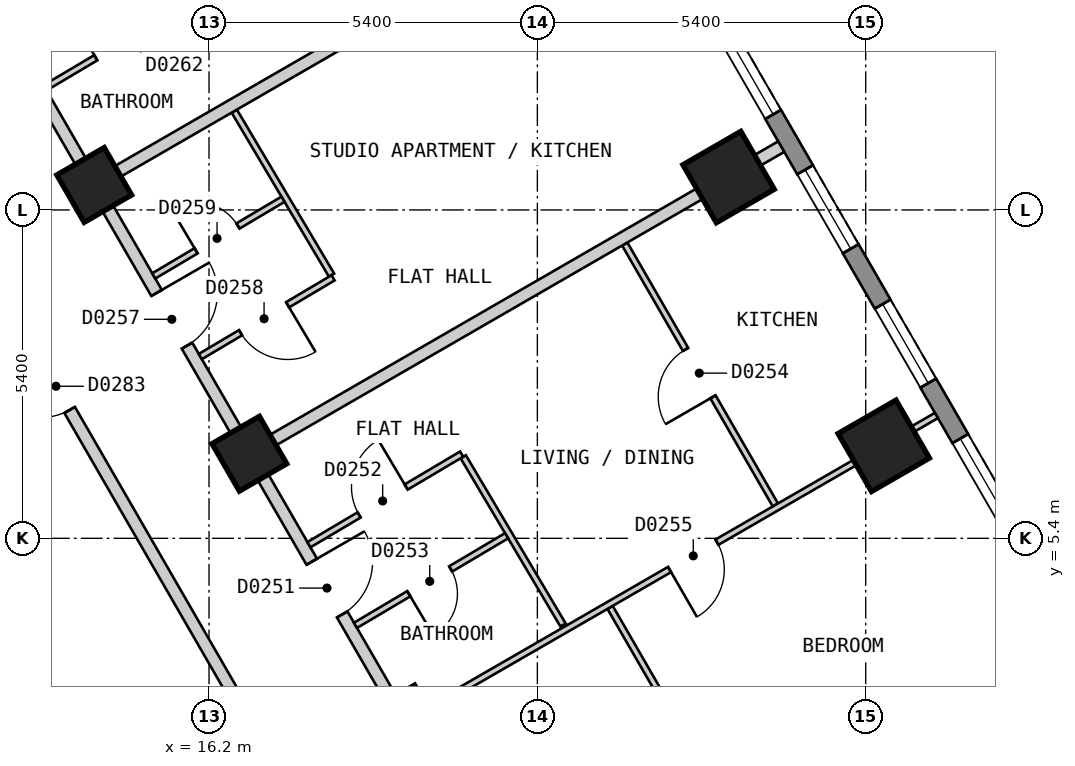
"""IFC4 building model, lengths in metres.
Left out: names, types, materials, properties, quantities, classifications, styles, units other than length and angle.
Written with IfcOpenShell. Run it as: python <this file> out.ifc"""

import sys

from ifc_helpers import new_model, si_unit, direction, frame, frame_2d, origin, origin_2d, place, context, subcontext, project, spatial, polyline, rectangle, outline, extrude, element, fill, save


model = new_model("IFC4")
c1 = context("Model", 3, precision=1e-05, world=origin(), true_north=direction((0.0, 1.0)))
c2 = subcontext(c1, "Body", "Model", "MODEL_VIEW")
j1 = project(units=[si_unit("LENGTHUNIT", "METRE"), si_unit("PLANEANGLEUNIT", "RADIAN")], contexts=[c1])
p1 = place(None, origin())
s1 = spatial("IfcSite", under=j1, at=p1, CompositionType="ELEMENT")
p2 = place(p1, origin())
s2 = spatial("IfcBuilding", under=s1, at=p2, CompositionType="ELEMENT")
p3 = place(p2, frame((0.0, 0.0, 47.4)))
s3 = spatial("IfcBuildingStorey", under=s2, at=p3, CompositionType="ELEMENT", Elevation=47.4)
for number, where, z_axis, x_axis in (
    (1, (29.848, 2.5, 0.0), (0.0, 0.0, 1.0), (-0.5, 0.866, 0.0)),
    (2, (27.297, 6.921, 0.0), (0.0, 0.0, 1.0), (-0.5, 0.866, 0.0)),
    (3, (24.745, 11.341, 0.0), (0.0, 0.0, 1.0), (-0.5, 0.866, 0.0)),
):
    element("IfcColumn", number, at=place(p3, frame(where, z_axis=z_axis, x_axis=x_axis)), inside=s3, PredefinedType="COLUMN", context=c2, shape_type="SweptSolid", body=[
        extrude(rectangle(XDim=1.1, YDim=1.1, at=origin_2d()), origin(), (0.0, 0.0, 1.0), 3.0),
    ])
for number, where, z_axis, x_axis in (
    (4, (19.416, 2.371, 0.0), (0.0, 0.0, 1.0), (-0.5, 0.866, 0.0)),
    (5, (16.864, 6.791, 0.0), (0.0, 0.0, 1.0), (-0.5, 0.866, 0.0)),
    (6, (14.312, 11.211, 0.0), (0.0, 0.0, 1.0), (-0.5, 0.866, 0.0)),
):
    element("IfcColumn", number, at=place(p3, frame(where, z_axis=z_axis, x_axis=x_axis)), inside=s3, PredefinedType="COLUMN", context=c2, shape_type="SweptSolid", body=[
        extrude(rectangle(XDim=0.9, YDim=0.9, at=origin_2d()), origin(), (0.0, 0.0, 1.0), 3.0),
    ])
p4 = place(p3, frame((31.22, 2.425, 0.0), z_axis=(0.0, 0.0, 1.0), x_axis=(-0.500001938803, 0.866024284413, 0.0)))
e7 = element("IfcWall", 7, at=p4, inside=s3, PredefinedType="SOLIDWALL", context=c2, shape_type="SweptSolid", body=[
    extrude(outline(polyline([(0.0, -0.15), (27.02, -0.15), (26.94, 0.15), (0.08, 0.15), (0.0, -0.15)])), origin(), (0.0, 0.0, 1.0), 2.7),
])
p5 = place(p4, frame((1.277, 0.0, 0.15)))
e8 = element("IfcOpeningElement", 8, at=p5, cuts=e7, PredefinedType="OPENING", context=c2, shape_type="SweptSolid", body=[
    extrude(rectangle(XDim=1.5, YDim=2.1, at=frame_2d((0.75, 1.05))), frame((0.0, 0.16, 0.0), z_axis=(0.0, -1.0, 0.0), x_axis=(1.0, 0.0, 0.0)), (0.0, 0.0, 1.0), 0.32),
])
p6 = place(p4, frame((3.829, 0.0, 0.15)))
e9 = element("IfcOpeningElement", 9, at=p6, cuts=e7, PredefinedType="OPENING", context=c2, shape_type="SweptSolid", body=[
    extrude(rectangle(XDim=1.5, YDim=2.1, at=frame_2d((0.75, 1.05))), frame((0.0, 0.16, 0.0), z_axis=(0.0, -1.0, 0.0), x_axis=(1.0, 0.0, 0.0)), (0.0, 0.0, 1.0), 0.32),
])
p7 = place(p4, frame((6.382, 0.0, 0.15)))
e10 = element("IfcOpeningElement", 10, at=p7, cuts=e7, PredefinedType="OPENING", context=c2, shape_type="SweptSolid", body=[
    extrude(rectangle(XDim=1.5, YDim=2.1, at=frame_2d((0.75, 1.05))), frame((0.0, 0.16, 0.0), z_axis=(0.0, -1.0, 0.0), x_axis=(1.0, 0.0, 0.0)), (0.0, 0.0, 1.0), 0.32),
])
p8 = place(p4, frame((8.933, 0.0, 0.15)))
e11 = element("IfcOpeningElement", 11, at=p8, cuts=e7, PredefinedType="OPENING", context=c2, shape_type="SweptSolid", body=[
    extrude(rectangle(XDim=1.5, YDim=2.1, at=frame_2d((0.75, 1.05))), frame((0.0, 0.16, 0.0), z_axis=(0.0, -1.0, 0.0), x_axis=(1.0, 0.0, 0.0)), (0.0, 0.0, 1.0), 0.32),
])
p9 = place(p4, frame((11.485, 0.0, 0.15)))
e12 = element("IfcOpeningElement", 12, at=p9, cuts=e7, PredefinedType="OPENING", context=c2, shape_type="SweptSolid", body=[
    extrude(rectangle(XDim=1.5, YDim=2.1, at=frame_2d((0.75, 1.05))), frame((0.0, 0.16, 0.0), z_axis=(0.0, -1.0, 0.0), x_axis=(1.0, 0.0, 0.0)), (0.0, 0.0, 1.0), 0.32),
])
p10 = place(p4, frame((14.037, 0.0, 0.15)))
e13 = element("IfcOpeningElement", 13, at=p10, cuts=e7, PredefinedType="OPENING", context=c2, shape_type="SweptSolid", body=[
    extrude(rectangle(XDim=1.5, YDim=2.1, at=frame_2d((0.75, 1.05))), frame((0.0, 0.16, 0.0), z_axis=(0.0, -1.0, 0.0), x_axis=(1.0, 0.0, 0.0)), (0.0, 0.0, 1.0), 0.32),
])
p11 = place(p4, frame((16.589, 0.0, 0.15)))
e14 = element("IfcOpeningElement", 14, at=p11, cuts=e7, PredefinedType="OPENING", context=c2, shape_type="SweptSolid", body=[
    extrude(rectangle(XDim=1.5, YDim=2.1, at=frame_2d((0.75, 1.05))), frame((0.0, 0.16, 0.0), z_axis=(0.0, -1.0, 0.0), x_axis=(1.0, 0.0, 0.0)), (0.0, 0.0, 1.0), 0.32),
])
p12 = place(p4, frame((19.141, 0.0, 0.15)))
e15 = element("IfcOpeningElement", 15, at=p12, cuts=e7, PredefinedType="OPENING", context=c2, shape_type="SweptSolid", body=[
    extrude(rectangle(XDim=1.5, YDim=2.1, at=frame_2d((0.75, 1.05))), frame((0.0, 0.16, 0.0), z_axis=(0.0, -1.0, 0.0), x_axis=(1.0, 0.0, 0.0)), (0.0, 0.0, 1.0), 0.32),
])
p13 = place(p4, frame((21.693, 0.0, 0.15)))
e16 = element("IfcOpeningElement", 16, at=p13, cuts=e7, PredefinedType="OPENING", context=c2, shape_type="SweptSolid", body=[
    extrude(rectangle(XDim=1.5, YDim=2.1, at=frame_2d((0.75, 1.05))), frame((0.0, 0.16, 0.0), z_axis=(0.0, -1.0, 0.0), x_axis=(1.0, 0.0, 0.0)), (0.0, 0.0, 1.0), 0.32),
])
p14 = place(p4, frame((24.244, 0.0, 0.15)))
e17 = element("IfcOpeningElement", 17, at=p14, cuts=e7, PredefinedType="OPENING", context=c2, shape_type="SweptSolid", body=[
    extrude(rectangle(XDim=1.5, YDim=2.1, at=frame_2d((0.75, 1.05))), frame((0.0, 0.16, 0.0), z_axis=(0.0, -1.0, 0.0), x_axis=(1.0, 0.0, 0.0)), (0.0, 0.0, 1.0), 0.32),
])
p15 = place(p3, frame((9.18, 15.7, 0.0), z_axis=(0.0, 0.0, 1.0), x_axis=(0.500003652032, -0.866023295272, 0.0)))
e18 = element("IfcWall", 18, at=p15, inside=s3, PredefinedType="PARTITIONING", context=c2, shape_type="SweptSolid", body=[
    extrude(rectangle(XDim=18.012, YDim=0.2, at=frame_2d((9.006, 0.0))), origin(), (0.0, 0.0, 1.0), 2.7),
])
p16 = place(p15, frame((8.556, 0.0, 0.0)))
e19 = element("IfcOpeningElement", 19, at=p16, cuts=e18, PredefinedType="OPENING", context=c2, shape_type="SweptSolid", body=[
    extrude(rectangle(XDim=0.9, YDim=2.1, at=frame_2d((0.45, 1.05))), frame((0.0, 0.11, 0.0), z_axis=(0.0, -1.0, 0.0), x_axis=(1.0, 0.0, 0.0)), (0.0, 0.0, 1.0), 0.22),
])
p17 = place(p3, frame((10.45, 17.9, 0.0), z_axis=(0.0, 0.0, 1.0), x_axis=(0.500034352617, -0.866005569383, 0.0)))
e20 = element("IfcWall", 20, at=p17, inside=s3, PredefinedType="PARTITIONING", context=c2, shape_type="SweptSolid", body=[
    extrude(rectangle(XDim=20.553, YDim=0.2, at=frame_2d((10.276, 0.0))), origin(), (0.0, 0.0, 1.0), 2.7),
])
p18 = place(p17, frame((14.879, 0.0, 0.0)))
e21 = element("IfcOpeningElement", 21, at=p18, cuts=e20, PredefinedType="OPENING", context=c2, shape_type="SweptSolid", body=[
    extrude(rectangle(XDim=1.0, YDim=2.1, at=frame_2d((0.5, 1.05))), frame((0.0, 0.11, 0.0), z_axis=(0.0, -1.0, 0.0), x_axis=(1.0, 0.0, 0.0)), (0.0, 0.0, 1.0), 0.22),
])
p19 = place(p17, frame((9.775, 0.0, 0.0)))
e22 = element("IfcOpeningElement", 22, at=p19, cuts=e20, PredefinedType="OPENING", context=c2, shape_type="SweptSolid", body=[
    extrude(rectangle(XDim=1.0, YDim=2.1, at=frame_2d((0.5, 1.05))), frame((0.0, 0.11, 0.0), z_axis=(0.0, -1.0, 0.0), x_axis=(1.0, 0.0, 0.0)), (0.0, 0.0, 1.0), 0.22),
])
p20 = place(p17, frame((4.671, 0.0, 0.0)))
e23 = element("IfcOpeningElement", 23, at=p20, cuts=e20, PredefinedType="OPENING", context=c2, shape_type="SweptSolid", body=[
    extrude(rectangle(XDim=1.0, YDim=2.1, at=frame_2d((0.5, 1.05))), frame((0.0, 0.11, 0.0), z_axis=(0.0, -1.0, 0.0), x_axis=(1.0, 0.0, 0.0)), (0.0, 0.0, 1.0), 0.22),
])
p21 = place(p3, frame((16.615, 12.425, 0.0), z_axis=(0.0, 0.0, 1.0), x_axis=(0.510241930604, -0.860030913546, 0.0)))
e24 = element("IfcWall", 24, at=p21, inside=s3, PredefinedType="PARTITIONING", context=c2, shape_type="SweptSolid", body=[
    extrude(rectangle(XDim=3.136, YDim=0.1, at=frame_2d((1.568, 0.0))), origin(), (0.0, 0.0, 1.0), 2.7),
])
p22 = place(p3, frame((20.381, 6.741, 0.0), z_axis=(0.0, 0.0, 1.0), x_axis=(0.510224755389, -0.860041103081, 0.0)))
e25 = element("IfcWall", 25, at=p22, inside=s3, PredefinedType="PARTITIONING", context=c2, shape_type="SweptSolid", body=[
    extrude(rectangle(XDim=3.216, YDim=0.1, at=frame_2d((1.608, 0.0))), origin(), (0.0, 0.0, 1.0), 2.7),
])
p23 = place(p3, frame((22.796, 4.264, 0.0), z_axis=(0.0, 0.0, 1.0), x_axis=(0.500099052605, -0.865968208183, 0.0)))
e26 = element("IfcWall", 26, at=p23, inside=s3, PredefinedType="PARTITIONING", context=c2, shape_type="SweptSolid", body=[
    extrude(rectangle(XDim=4.807, YDim=0.1, at=frame_2d((2.404, 0.0))), origin(), (0.0, 0.0, 1.0), 2.7),
])
p24 = place(p23, frame((2.037, 0.0, 0.0)))
e27 = element("IfcOpeningElement", 27, at=p24, cuts=e26, PredefinedType="OPENING", context=c2, shape_type="SweptSolid", body=[
    extrude(rectangle(XDim=0.8, YDim=2.1, at=frame_2d((0.4, 1.05))), frame((0.0, 0.06, 0.0), z_axis=(0.0, -1.0, 0.0), x_axis=(1.0, 0.0, 0.0)), (0.0, 0.0, 1.0), 0.12),
])
p25 = place(p3, frame((23.037, 10.24, 0.0), z_axis=(0.0, 0.0, 1.0), x_axis=(0.499907296314, -0.866078919667, 0.0)))
e28 = element("IfcWall", 28, at=p25, inside=s3, PredefinedType="PARTITIONING", context=c2, shape_type="SweptSolid", body=[
    extrude(rectangle(XDim=4.955, YDim=0.1, at=frame_2d((2.477, 0.0))), origin(), (0.0, 0.0, 1.0), 2.7),
])
p26 = place(p25, frame((2.002, 0.0, 0.0)))
e29 = element("IfcOpeningElement", 29, at=p26, cuts=e28, PredefinedType="OPENING", context=c2, shape_type="SweptSolid", body=[
    extrude(rectangle(XDim=0.9, YDim=2.1, at=frame_2d((0.45, 1.05))), frame((0.0, 0.06, 0.0), z_axis=(0.0, -1.0, 0.0), x_axis=(1.0, 0.0, 0.0)), (0.0, 0.0, 1.0), 0.12),
])
p27 = place(p3, frame((19.503, 2.421, 0.0), z_axis=(0.0, 0.0, 1.0), x_axis=(0.866065245018, 0.499930986609, 0.0)))
e30 = element("IfcWall", 30, at=p27, inside=s3, PredefinedType="PARTITIONING", context=c2, shape_type="SweptSolid", body=[
    extrude(rectangle(XDim=10.0, YDim=0.1, at=frame_2d((5.0, 0.0))), origin(), (0.0, 0.0, 1.0), 2.7),
])
p28 = place(p27, frame((4.932, 0.0, 0.0)))
e31 = element("IfcOpeningElement", 31, at=p28, cuts=e30, PredefinedType="OPENING", context=c2, shape_type="SweptSolid", body=[
    extrude(rectangle(XDim=0.9, YDim=2.1, at=frame_2d((0.45, 1.05))), frame((0.0, 0.06, 0.0), z_axis=(0.0, -1.0, 0.0), x_axis=(1.0, 0.0, 0.0)), (0.0, 0.0, 1.0), 0.12),
])
p29 = place(p3, frame((17.843, 5.295, 0.0), z_axis=(0.0, 0.0, 1.0), x_axis=(0.860078277555, 0.510162088436, 0.0)))
e32 = element("IfcWall", 32, at=p29, inside=s3, PredefinedType="PARTITIONING", context=c2, shape_type="SweptSolid", body=[
    extrude(rectangle(XDim=2.921, YDim=0.1, at=frame_2d((1.46, 0.0))), origin(), (0.0, 0.0, 1.0), 2.7),
])
p30 = place(p29, frame((0.96, 0.0, 0.0)))
e33 = element("IfcOpeningElement", 33, at=p30, cuts=e32, PredefinedType="OPENING", context=c2, shape_type="SweptSolid", body=[
    extrude(rectangle(XDim=0.9, YDim=2.1, at=frame_2d((0.45, 1.05))), frame((0.0, 0.06, 0.0), z_axis=(0.0, -1.0, 0.0), x_axis=(1.0, 0.0, 0.0)), (0.0, 0.0, 1.0), 0.12),
])
p31 = place(p3, frame((18.609, 3.969, 0.0), z_axis=(0.0, 0.0, 1.0), x_axis=(0.860254465905, 0.50986493691, 0.0)))
e34 = element("IfcWall", 34, at=p31, inside=s3, PredefinedType="PARTITIONING", context=c2, shape_type="SweptSolid", body=[
    extrude(rectangle(XDim=2.889, YDim=0.1, at=frame_2d((1.444, 0.0))), origin(), (0.0, 0.0, 1.0), 2.7),
])
p32 = place(p31, frame((1.019, 0.0, 0.0)))
e35 = element("IfcOpeningElement", 35, at=p32, cuts=e34, PredefinedType="OPENING", context=c2, shape_type="SweptSolid", body=[
    extrude(rectangle(XDim=0.8, YDim=2.1, at=frame_2d((0.4, 1.05))), frame((0.0, 0.06, 0.0), z_axis=(0.0, -1.0, 0.0), x_axis=(1.0, 0.0, 0.0)), (0.0, 0.0, 1.0), 0.12),
])
p33 = place(p3, frame((16.057, 8.389, 0.0), z_axis=(0.0, 0.0, 1.0), x_axis=(0.860036770423, 0.510232058499, 0.0)))
e36 = element("IfcWall", 36, at=p33, inside=s3, PredefinedType="PARTITIONING", context=c2, shape_type="SweptSolid", body=[
    extrude(rectangle(XDim=2.538, YDim=0.1, at=frame_2d((1.269, 0.0))), origin(), (0.0, 0.0, 1.0), 2.7),
])
p34 = place(p33, frame((0.769, 0.0, 0.0)))
e37 = element("IfcOpeningElement", 37, at=p34, cuts=e36, PredefinedType="OPENING", context=c2, shape_type="SweptSolid", body=[
    extrude(rectangle(XDim=0.9, YDim=2.1, at=frame_2d((0.45, 1.05))), frame((0.0, 0.06, 0.0), z_axis=(0.0, -1.0, 0.0), x_axis=(1.0, 0.0, 0.0)), (0.0, 0.0, 1.0), 0.12),
])
p35 = place(p3, frame((13.505, 12.809, 0.0), z_axis=(0.0, 0.0, 1.0), x_axis=(0.860070102739, 0.510175870043, 0.0)))
e38 = element("IfcWall", 38, at=p35, inside=s3, PredefinedType="PARTITIONING", context=c2, shape_type="SweptSolid", body=[
    extrude(rectangle(XDim=2.938, YDim=0.1, at=frame_2d((1.469, 0.0))), origin(), (0.0, 0.0, 1.0), 2.7),
])
p36 = place(p35, frame((0.969, 0.0, 0.0)))
e39 = element("IfcOpeningElement", 39, at=p36, cuts=e38, PredefinedType="OPENING", context=c2, shape_type="SweptSolid", body=[
    extrude(rectangle(XDim=0.9, YDim=2.1, at=frame_2d((0.45, 1.05))), frame((0.0, 0.06, 0.0), z_axis=(0.0, -1.0, 0.0), x_axis=(1.0, 0.0, 0.0)), (0.0, 0.0, 1.0), 0.12),
])
p37 = place(p3, frame((15.291, 9.715, 0.0), z_axis=(0.0, 0.0, 1.0), x_axis=(0.860087708271, 0.510146188932, 0.0)))
e40 = element("IfcWall", 40, at=p37, inside=s3, PredefinedType="PARTITIONING", context=c2, shape_type="SweptSolid", body=[
    extrude(rectangle(XDim=2.472, YDim=0.1, at=frame_2d((1.236, 0.0))), origin(), (0.0, 0.0, 1.0), 2.7),
])
p38 = place(p37, frame((0.81, 0.0, 0.0)))
e41 = element("IfcOpeningElement", 41, at=p38, cuts=e40, PredefinedType="OPENING", context=c2, shape_type="SweptSolid", body=[
    extrude(rectangle(XDim=0.8, YDim=2.1, at=frame_2d((0.4, 1.05))), frame((0.0, 0.06, 0.0), z_axis=(0.0, -1.0, 0.0), x_axis=(1.0, 0.0, 0.0)), (0.0, 0.0, 1.0), 0.12),
])
p39 = place(p3, frame((25.519, 0.001, 0.0), z_axis=(0.0, 0.0, 1.0), x_axis=(0.86609140076, 0.499885672459, 0.0)))
e42 = element("IfcWall", 42, at=p39, inside=s3, PredefinedType="PARTITIONING", context=c2, shape_type="SweptSolid", body=[
    extrude(rectangle(XDim=6.0, YDim=0.2, at=frame_2d((3.0, 0.0))), origin(), (0.0, 0.0, 1.0), 2.7),
])
for number, where, z_axis, x_axis in (
    (43, (16.95, 6.841, 0.0), (0.0, 0.0, 1.0), (0.866, 0.5, 0.0)),
    (44, (14.399, 11.261, 0.0), (0.0, 0.0, 1.0), (0.866, 0.5, 0.0)),
):
    element("IfcWall", number, at=place(p3, frame(where, z_axis=z_axis, x_axis=x_axis)), inside=s3, PredefinedType="PARTITIONING", context=c2, shape_type="SweptSolid", body=[
        extrude(rectangle(XDim=10.0, YDim=0.2, at=frame_2d((5.0, 0.0))), origin(), (0.0, 0.0, 1.0), 2.7),
    ])
p40 = place(p6, origin())
e45 = element("IfcWindow", 45, at=p40, inside=s3, PartitioningType="SINGLE_PANEL", PredefinedType="WINDOW", context=c2, shape_type="SweptSolid", body=[
    extrude(rectangle(XDim=1.5, YDim=2.1, at=frame_2d((0.75, 1.05))), frame((0.0, 0.03, 0.0), z_axis=(0.0, -1.0, 0.0), x_axis=(1.0, 0.0, 0.0)), (0.0, 0.0, 1.0), 0.06),
])
fill(e9, e45)
p41 = place(p7, origin())
e46 = element("IfcWindow", 46, at=p41, inside=s3, PartitioningType="SINGLE_PANEL", PredefinedType="WINDOW", context=c2, shape_type="SweptSolid", body=[
    extrude(rectangle(XDim=1.5, YDim=2.1, at=frame_2d((0.75, 1.05))), frame((0.0, 0.03, 0.0), z_axis=(0.0, -1.0, 0.0), x_axis=(1.0, 0.0, 0.0)), (0.0, 0.0, 1.0), 0.06),
])
fill(e10, e46)
p42 = place(p8, origin())
e47 = element("IfcWindow", 47, at=p42, inside=s3, PartitioningType="SINGLE_PANEL", PredefinedType="WINDOW", context=c2, shape_type="SweptSolid", body=[
    extrude(rectangle(XDim=1.5, YDim=2.1, at=frame_2d((0.75, 1.05))), frame((0.0, 0.03, 0.0), z_axis=(0.0, -1.0, 0.0), x_axis=(1.0, 0.0, 0.0)), (0.0, 0.0, 1.0), 0.06),
])
fill(e11, e47)
p43 = place(p9, origin())
e48 = element("IfcWindow", 48, at=p43, inside=s3, PartitioningType="SINGLE_PANEL", PredefinedType="WINDOW", context=c2, shape_type="SweptSolid", body=[
    extrude(rectangle(XDim=1.5, YDim=2.1, at=frame_2d((0.75, 1.05))), frame((0.0, 0.03, 0.0), z_axis=(0.0, -1.0, 0.0), x_axis=(1.0, 0.0, 0.0)), (0.0, 0.0, 1.0), 0.06),
])
fill(e12, e48)
p44 = place(p18, origin())
e49 = element("IfcDoor", 49, at=p44, inside=s3, OperationType="SINGLE_SWING_LEFT", PredefinedType="DOOR", context=c2, shape_type="SweptSolid", body=[
    extrude(rectangle(XDim=1.0, YDim=2.1, at=frame_2d((0.5, 1.05))), frame((0.0, 0.025, 0.0), z_axis=(0.0, -1.0, 0.0), x_axis=(1.0, 0.0, 0.0)), (0.0, 0.0, 1.0), 0.05),
])
fill(e21, e49)
p45 = place(p30, origin())
e50 = element("IfcDoor", 50, at=p45, inside=s3, OperationType="SINGLE_SWING_RIGHT", PredefinedType="DOOR", context=c2, shape_type="SweptSolid", body=[
    extrude(rectangle(XDim=0.9, YDim=2.1, at=frame_2d((0.45, 1.05))), frame((0.0, 0.025, 0.0), z_axis=(0.0, -1.0, 0.0), x_axis=(1.0, 0.0, 0.0)), (0.0, 0.0, 1.0), 0.05),
])
fill(e33, e50)
p46 = place(p32, origin())
e51 = element("IfcDoor", 51, at=p46, inside=s3, OperationType="SINGLE_SWING_LEFT", PredefinedType="DOOR", context=c2, shape_type="SweptSolid", body=[
    extrude(rectangle(XDim=0.8, YDim=2.1, at=frame_2d((0.4, 1.05))), frame((0.0, 0.025, 0.0), z_axis=(0.0, -1.0, 0.0), x_axis=(1.0, 0.0, 0.0)), (0.0, 0.0, 1.0), 0.05),
])
fill(e35, e51)
p47 = place(p26, origin())
e52 = element("IfcDoor", 52, at=p47, inside=s3, OperationType="SINGLE_SWING_RIGHT", PredefinedType="DOOR", context=c2, shape_type="SweptSolid", body=[
    extrude(rectangle(XDim=0.9, YDim=2.1, at=frame_2d((0.45, 1.05))), frame((0.0, 0.025, 0.0), z_axis=(0.0, -1.0, 0.0), x_axis=(1.0, 0.0, 0.0)), (0.0, 0.0, 1.0), 0.05),
])
fill(e29, e52)
p48 = place(p28, origin())
e53 = element("IfcDoor", 53, at=p48, inside=s3, OperationType="SINGLE_SWING_LEFT", PredefinedType="DOOR", context=c2, shape_type="SweptSolid", body=[
    extrude(rectangle(XDim=0.9, YDim=2.1, at=frame_2d((0.45, 1.05))), frame((0.0, 0.025, 0.0), z_axis=(0.0, -1.0, 0.0), x_axis=(1.0, 0.0, 0.0)), (0.0, 0.0, 1.0), 0.05),
])
fill(e31, e53)
p49 = place(p19, origin())
e54 = element("IfcDoor", 54, at=p49, inside=s3, OperationType="SINGLE_SWING_LEFT", PredefinedType="DOOR", context=c2, shape_type="SweptSolid", body=[
    extrude(rectangle(XDim=1.0, YDim=2.1, at=frame_2d((0.5, 1.05))), frame((0.0, 0.025, 0.0), z_axis=(0.0, -1.0, 0.0), x_axis=(1.0, 0.0, 0.0)), (0.0, 0.0, 1.0), 0.05),
])
fill(e22, e54)
p50 = place(p34, origin())
e55 = element("IfcDoor", 55, at=p50, inside=s3, OperationType="SINGLE_SWING_RIGHT", PredefinedType="DOOR", context=c2, shape_type="SweptSolid", body=[
    extrude(rectangle(XDim=0.9, YDim=2.1, at=frame_2d((0.45, 1.05))), frame((0.0, 0.025, 0.0), z_axis=(0.0, -1.0, 0.0), x_axis=(1.0, 0.0, 0.0)), (0.0, 0.0, 1.0), 0.05),
])
fill(e37, e55)
p51 = place(p38, origin())
e56 = element("IfcDoor", 56, at=p51, inside=s3, OperationType="SINGLE_SWING_LEFT", PredefinedType="DOOR", context=c2, shape_type="SweptSolid", body=[
    extrude(rectangle(XDim=0.8, YDim=2.1, at=frame_2d((0.4, 1.05))), frame((0.0, 0.025, 0.0), z_axis=(0.0, -1.0, 0.0), x_axis=(1.0, 0.0, 0.0)), (0.0, 0.0, 1.0), 0.05),
])
fill(e41, e56)
p52 = place(p36, origin())
e57 = element("IfcDoor", 57, at=p52, inside=s3, OperationType="SINGLE_SWING_LEFT", PredefinedType="DOOR", context=c2, shape_type="SweptSolid", body=[
    extrude(rectangle(XDim=0.9, YDim=2.1, at=frame_2d((0.45, 1.05))), frame((0.0, 0.025, 0.0), z_axis=(0.0, -1.0, 0.0), x_axis=(1.0, 0.0, 0.0)), (0.0, 0.0, 1.0), 0.05),
])
fill(e39, e57)
p53 = place(p16, origin())
e58 = element("IfcDoor", 58, at=p53, inside=s3, OperationType="SINGLE_SWING_LEFT", PredefinedType="DOOR", context=c2, shape_type="SweptSolid", body=[
    extrude(rectangle(XDim=0.9, YDim=2.1, at=frame_2d((0.45, 1.05))), frame((0.0, 0.025, 0.0), z_axis=(0.0, -1.0, 0.0), x_axis=(1.0, 0.0, 0.0)), (0.0, 0.0, 1.0), 0.05),
])
fill(e19, e58)
save(model, sys.argv[1])
